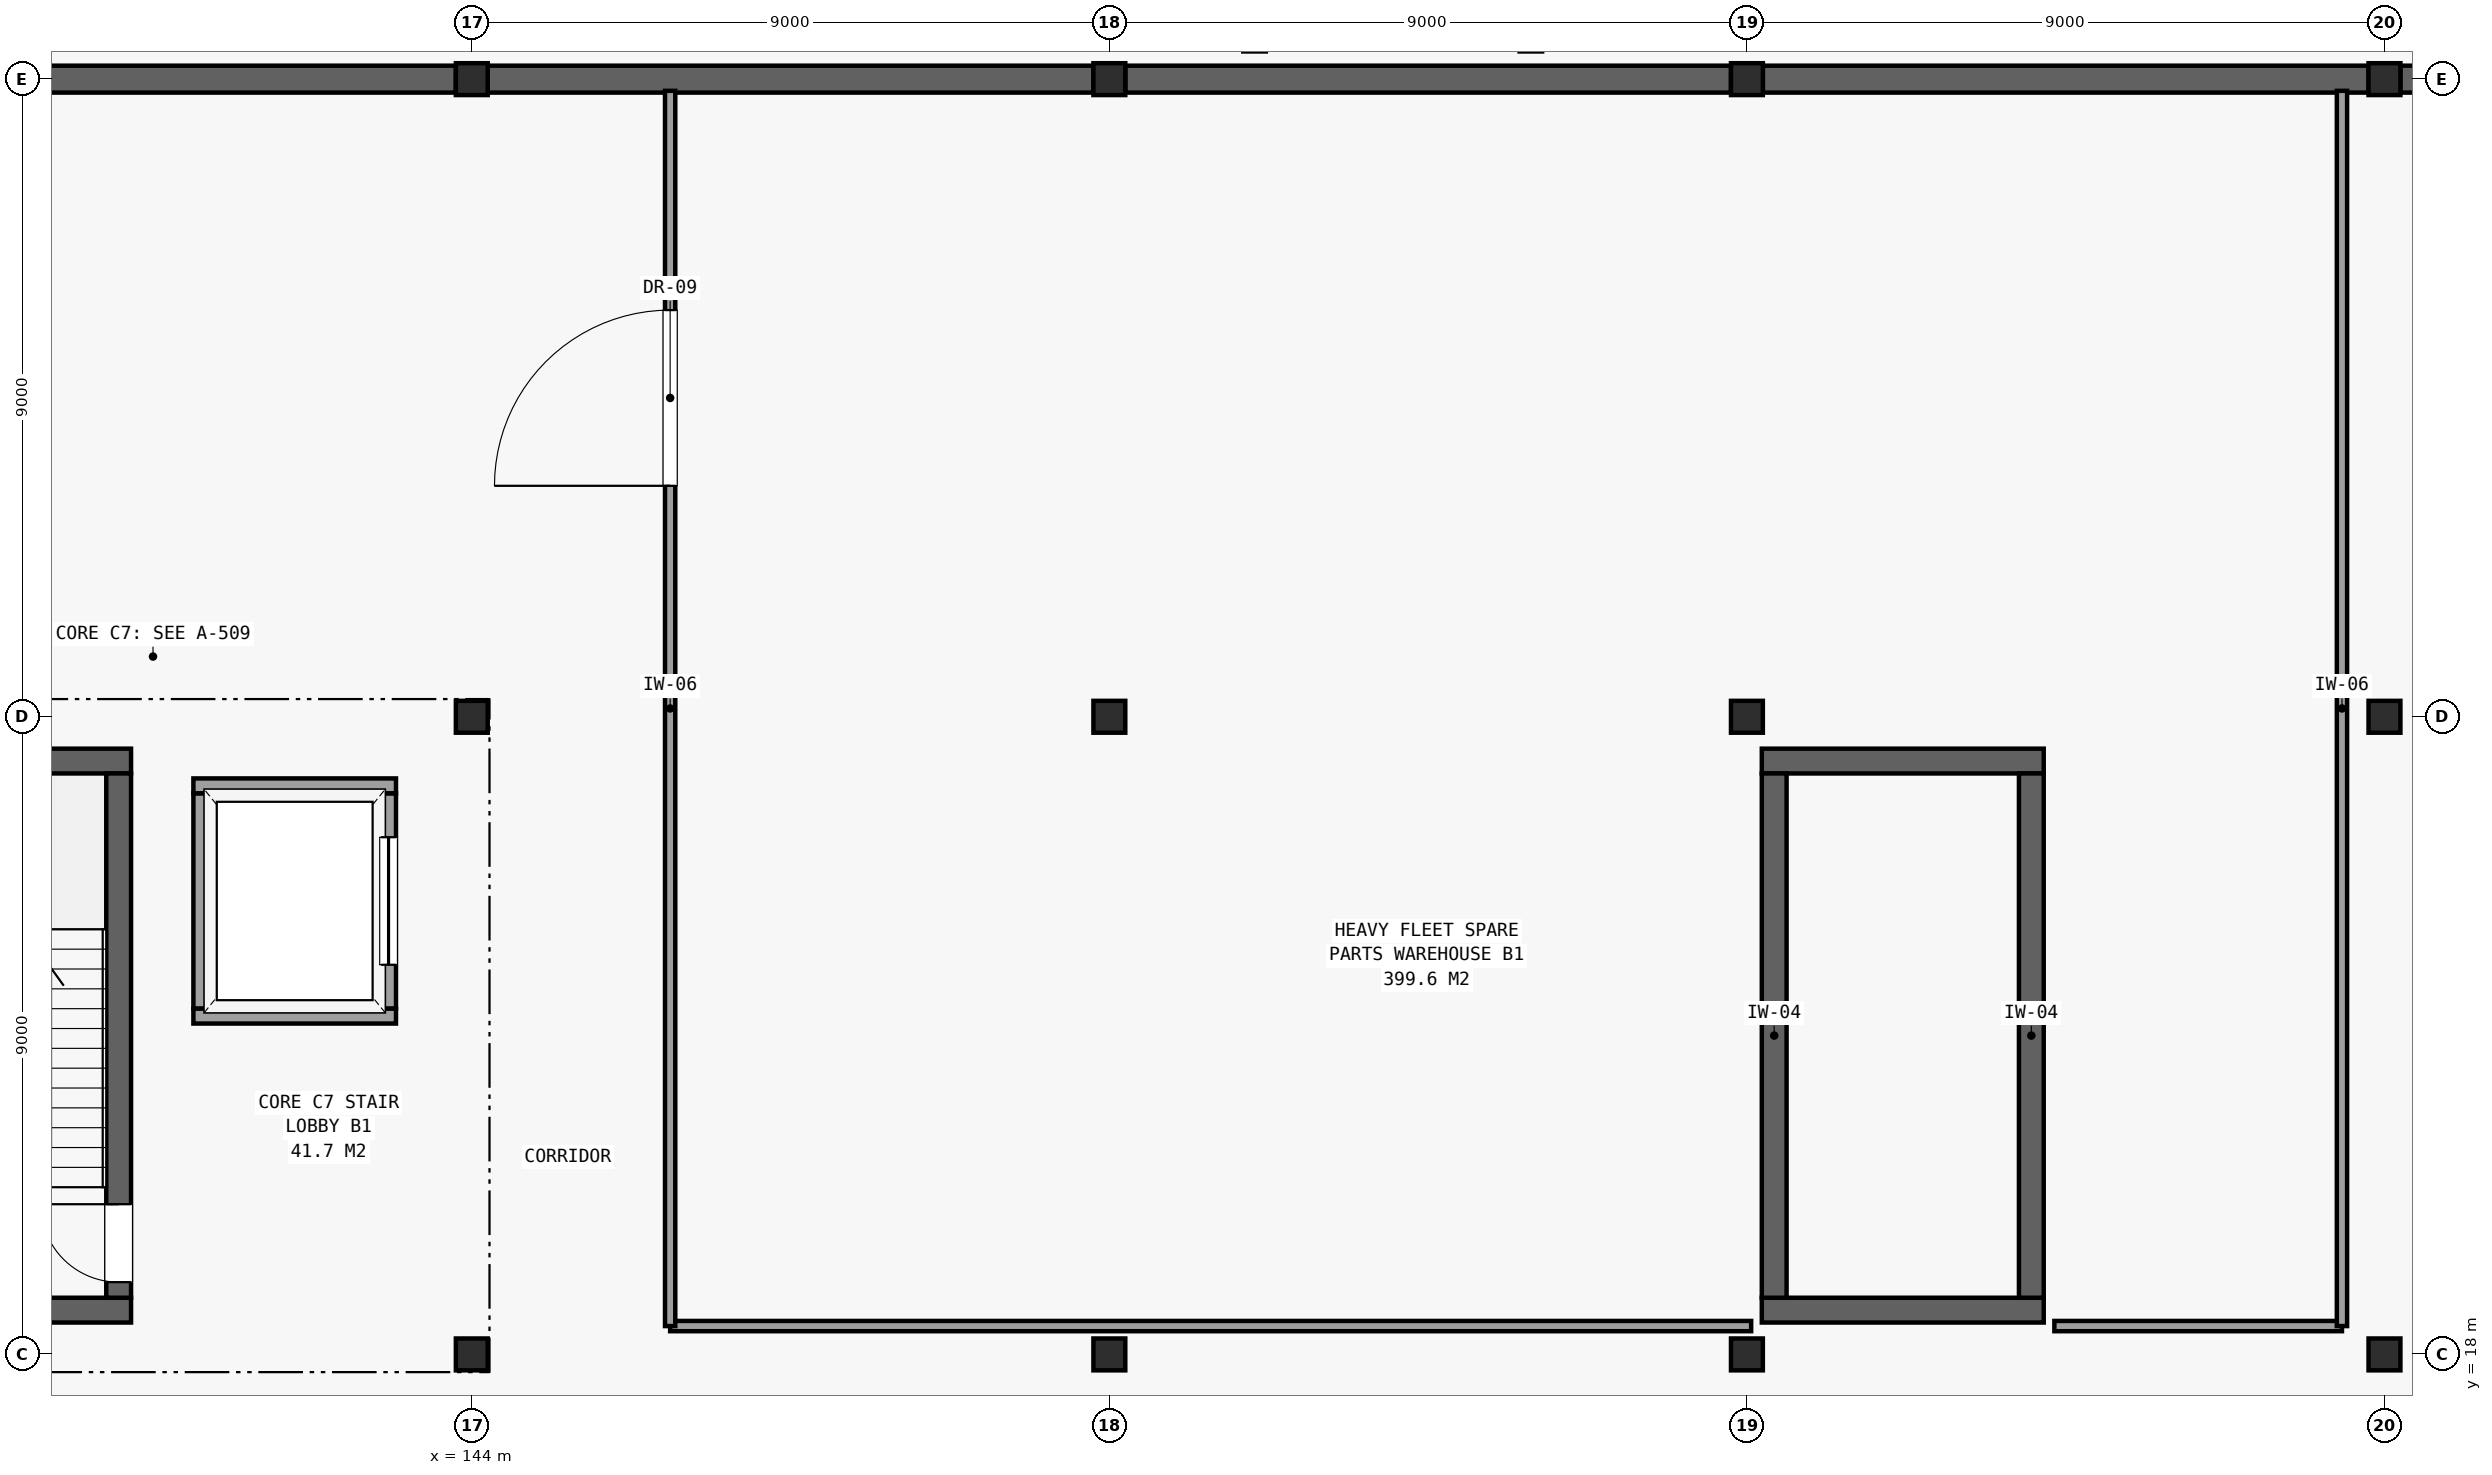
"""IFC4 building model, lengths in metres.
Left out: names, types, materials, properties, quantities, classifications, styles, units other than length and angle.
Written with IfcOpenShell. Run it as: python <this file> out.ifc"""

import sys

from ifc_helpers import new_model, si_unit, direction, frame, frame_2d, origin, origin_2d, place, context, subcontext, project, spatial, rectangle, hollow_rectangle, extrude, element, fill, save


model = new_model("IFC4")
c1 = context("Model", 3, precision=1e-05, world=origin(), true_north=direction((0.0, 1.0)))
c2 = subcontext(c1, "Body", "Model", "MODEL_VIEW")
j1 = project(units=[si_unit("LENGTHUNIT", "METRE"), si_unit("PLANEANGLEUNIT", "RADIAN")], contexts=[c1])
p1 = place(None, origin())
s1 = spatial("IfcSite", under=j1, at=p1, CompositionType="ELEMENT")
p2 = place(p1, origin())
s2 = spatial("IfcBuilding", under=s1, at=p2, CompositionType="ELEMENT")
p3 = place(p2, frame((0.0, 0.0, -4.8)))
s3 = spatial("IfcBuildingStorey", under=s2, at=p3, CompositionType="ELEMENT", Elevation=-4.8)
for number, where, z_axis, x_axis in (
    (1, (144.0, 18.0, 0.0), (0.0, 0.0, 1.0), (1.0, 0.0, 0.0)),
    (2, (144.0, 27.0, 0.0), (0.0, 0.0, 1.0), (1.0, 0.0, 0.0)),
    (3, (144.0, 36.0, 0.0), (0.0, 0.0, 1.0), (1.0, 0.0, 0.0)),
    (4, (153.0, 18.0, 0.0), (0.0, 0.0, 1.0), (1.0, 0.0, 0.0)),
    (5, (153.0, 27.0, 0.0), (0.0, 0.0, 1.0), (1.0, 0.0, 0.0)),
    (6, (153.0, 36.0, 0.0), (0.0, 0.0, 1.0), (1.0, 0.0, 0.0)),
    (7, (162.0, 18.0, 0.0), (0.0, 0.0, 1.0), (1.0, 0.0, 0.0)),
    (8, (162.0, 27.0, 0.0), (0.0, 0.0, 1.0), (1.0, 0.0, 0.0)),
    (9, (162.0, 36.0, 0.0), (0.0, 0.0, 1.0), (1.0, 0.0, 0.0)),
    (10, (171.0, 18.0, 0.0), (0.0, 0.0, 1.0), (1.0, 0.0, 0.0)),
    (11, (171.0, 27.0, 0.0), (0.0, 0.0, 1.0), (1.0, 0.0, 0.0)),
    (12, (171.0, 36.0, 0.0), (0.0, 0.0, 1.0), (1.0, 0.0, 0.0)),
):
    element("IfcColumn", number, at=place(p3, frame(where, z_axis=z_axis, x_axis=x_axis)), inside=s3, PredefinedType="COLUMN", context=c2, shape_type="SweptSolid", body=[
        extrude(hollow_rectangle(XDim=0.45, YDim=0.45, WallThickness=0.022, at=origin_2d()), origin(), (0.0, 0.0, 1.0), 4.8),
    ])
for number, where, z_axis, x_axis in (
    (13, (179.775, 36.0, 0.0), (0.0, 0.0, 1.0), (-1.0, 0.0, 0.0)),
    (14, (170.775, 36.0, 0.0), (0.0, 0.0, 1.0), (-1.0, 0.0, 0.0)),
    (15, (161.775, 36.0, 0.0), (0.0, 0.0, 1.0), (-1.0, 0.0, 0.0)),
    (16, (152.775, 36.0, 0.0), (0.0, 0.0, 1.0), (-1.0, 0.0, 0.0)),
    (17, (143.775, 36.0, 0.0), (0.0, 0.0, 1.0), (-1.0, 0.0, 0.0)),
):
    element("IfcWall", number, at=place(p3, frame(where, z_axis=z_axis, x_axis=x_axis)), inside=s3, PredefinedType="USERDEFINED", context=c2, shape_type="SweptSolid", body=[
        extrude(rectangle(XDim=8.55, YDim=0.38, at=frame_2d((4.275, 0.0))), origin(), (0.0, 0.0, 1.0), 4.13),
    ])
for number, where, z_axis, x_axis in (
    (18, (135.21, 18.625, 0.0), (0.0, 0.0, 1.0), (1.0, 0.0, 0.0)),
    (19, (135.21, 26.375, 0.0), (0.0, 0.0, 1.0), (1.0, 0.0, 0.0)),
):
    element("IfcWall", number, at=place(p3, frame(where, z_axis=z_axis, x_axis=x_axis)), inside=s3, PredefinedType="SHEAR", context=c2, shape_type="SweptSolid", body=[
        extrude(rectangle(XDim=3.98, YDim=0.35, at=frame_2d((1.99, 0.0))), origin(), (0.0, 0.0, 1.0), 4.52),
    ])
p4 = place(p3, frame((139.015, 18.8, 0.0), z_axis=(0.0, 0.0, 1.0), x_axis=(0.0, 1.0, 0.0)))
e20 = element("IfcWall", 20, at=p4, inside=s3, PredefinedType="SHEAR", context=c2, shape_type="SweptSolid", body=[
    extrude(rectangle(XDim=7.4, YDim=0.35, at=frame_2d((3.7, 0.0))), origin(), (0.0, 0.0, 1.0), 4.52),
])
p5 = place(p4, frame((0.22, 0.0, 0.0)))
e21 = element("IfcOpeningElement", 21, at=p5, cuts=e20, PredefinedType="OPENING", context=c2, shape_type="SweptSolid", body=[
    extrude(rectangle(XDim=1.1, YDim=2.15, at=frame_2d((0.55, 1.075))), frame((0.0, 0.186, 0.0), z_axis=(0.0, -1.0, 0.0), x_axis=(1.0, 0.0, 0.0)), (0.0, 0.0, 1.0), 0.372),
])
p6 = place(p3, frame((142.825, 22.88, 0.0), z_axis=(0.0, 0.0, 1.0), x_axis=(0.0, 1.0, 0.0)))
e22 = element("IfcWall", 22, at=p6, inside=s3, PredefinedType="PARTITIONING", context=c2, shape_type="SweptSolid", body=[
    extrude(rectangle(XDim=3.04, YDim=0.21, at=frame_2d((1.52, 0.0))), origin(), (0.0, 0.0, 1.0), 4.52),
])
p7 = place(p6, frame((0.62, 0.0, 0.0)))
e23 = element("IfcOpeningElement", 23, at=p7, cuts=e22, PredefinedType="OPENING", context=c2, shape_type="SweptSolid", body=[
    extrude(rectangle(XDim=1.8, YDim=2.4, at=frame_2d((0.9, 1.2))), frame((0.0, 0.116, 0.0), z_axis=(0.0, -1.0, 0.0), x_axis=(1.0, 0.0, 0.0)), (0.0, 0.0, 1.0), 0.232),
])
p8 = place(p3, frame((140.175, 22.88, 0.0), z_axis=(0.0, 0.0, 1.0), x_axis=(0.0, 1.0, 0.0)))
e24 = element("IfcWall", 24, at=p8, inside=s3, PredefinedType="PARTITIONING", context=c2, shape_type="SweptSolid", body=[
    extrude(rectangle(XDim=3.04, YDim=0.21, at=frame_2d((1.52, 0.0))), origin(), (0.0, 0.0, 1.0), 4.52),
])
for number, where, z_axis, x_axis in (
    (25, (140.07, 22.775, 0.0), (0.0, 0.0, 1.0), (1.0, 0.0, 0.0)),
    (26, (140.07, 26.025, 0.0), (0.0, 0.0, 1.0), (1.0, 0.0, 0.0)),
):
    element("IfcWall", number, at=place(p3, frame(where, z_axis=z_axis, x_axis=x_axis)), inside=s3, PredefinedType="PARTITIONING", context=c2, shape_type="SweptSolid", body=[
        extrude(rectangle(XDim=2.86, YDim=0.21, at=frame_2d((1.43, 0.0))), origin(), (0.0, 0.0, 1.0), 4.52),
    ])
for number, where, z_axis, x_axis in (
    (27, (162.21, 18.625, 0.0), (0.0, 0.0, 1.0), (1.0, 0.0, 0.0)),
    (28, (162.21, 26.375, 0.0), (0.0, 0.0, 1.0), (1.0, 0.0, 0.0)),
):
    element("IfcWall", number, at=place(p3, frame(where, z_axis=z_axis, x_axis=x_axis)), inside=s3, PredefinedType="SHEAR", context=c2, shape_type="SweptSolid", body=[
        extrude(rectangle(XDim=3.98, YDim=0.35, at=frame_2d((1.99, 0.0))), origin(), (0.0, 0.0, 1.0), 4.52),
    ])
for number, where, z_axis, x_axis in (
    (29, (162.385, 18.8, 0.0), (0.0, 0.0, 1.0), (0.0, 1.0, 0.0)),
    (30, (166.015, 18.8, 0.0), (0.0, 0.0, 1.0), (0.0, 1.0, 0.0)),
):
    element("IfcWall", number, at=place(p3, frame(where, z_axis=z_axis, x_axis=x_axis)), inside=s3, PredefinedType="SHEAR", context=c2, shape_type="SweptSolid", body=[
        extrude(rectangle(XDim=7.4, YDim=0.35, at=frame_2d((3.7, 0.0))), origin(), (0.0, 0.0, 1.0), 4.52),
    ])
p9 = place(p3, frame((146.8, 18.4, 0.0), z_axis=(0.0, 0.0, 1.0), x_axis=(1.0, 0.0, 0.0)))
e31 = element("IfcWall", 31, at=p9, inside=s3, PredefinedType="PARTITIONING", context=c2, shape_type="SweptSolid", body=[
    extrude(rectangle(XDim=15.26, YDim=0.145, at=frame_2d((7.63, 0.0))), origin(), (0.0, 0.0, 1.0), 3.87),
])
p10 = place(p3, frame((166.34, 18.4, 0.0), z_axis=(0.0, 0.0, 1.0), x_axis=(1.0, 0.0, 0.0)))
e32 = element("IfcWall", 32, at=p10, inside=s3, PredefinedType="PARTITIONING", context=c2, shape_type="SweptSolid", body=[
    extrude(rectangle(XDim=4.06, YDim=0.145, at=frame_2d((2.03, 0.0))), origin(), (0.0, 0.0, 1.0), 4.52),
])
p11 = place(p3, frame((146.8, 18.4, 0.0), z_axis=(0.0, 0.0, 1.0), x_axis=(0.0, 1.0, 0.0)))
e33 = element("IfcWall", 33, at=p11, inside=s3, PredefinedType="PARTITIONING", context=c2, shape_type="SweptSolid", body=[
    extrude(rectangle(XDim=17.435, YDim=0.145, at=frame_2d((8.718, 0.0))), origin(), (0.0, 0.0, 1.0), 3.92),
])
p12 = place(p11, frame((11.86, 0.0, 0.0)))
e34 = element("IfcOpeningElement", 34, at=p12, cuts=e33, PredefinedType="OPENING", context=c2, shape_type="SweptSolid", body=[
    extrude(rectangle(XDim=2.48, YDim=3.026, at=frame_2d((1.24, 1.513))), frame((0.0, 0.083, 0.0), z_axis=(0.0, -1.0, 0.0), x_axis=(1.0, 0.0, 0.0)), (0.0, 0.0, 1.0), 0.167),
])
p13 = place(p3, frame((170.4, 18.4, 0.0), z_axis=(0.0, 0.0, 1.0), x_axis=(0.0, 1.0, 0.0)))
e35 = element("IfcWall", 35, at=p13, inside=s3, PredefinedType="PARTITIONING", context=c2, shape_type="SweptSolid", body=[
    extrude(rectangle(XDim=17.435, YDim=0.145, at=frame_2d((8.718, 0.0))), origin(), (0.0, 0.0, 1.0), 3.92),
])
p14 = place(p5, origin())
e36 = element("IfcDoor", 36, at=p14, inside=s3, OperationType="SINGLE_SWING_RIGHT", PredefinedType="DOOR", context=c2, shape_type="SweptSolid", body=[
    extrude(rectangle(XDim=1.1, YDim=2.15, at=frame_2d((0.55, 1.075))), frame((0.0, 0.025, 0.0), z_axis=(0.0, -1.0, 0.0), x_axis=(1.0, 0.0, 0.0)), (0.0, 0.0, 1.0), 0.05),
])
fill(e21, e36)
p15 = place(p7, origin())
e37 = element("IfcDoor", 37, at=p15, inside=s3, OperationType="SLIDING_TO_LEFT", PredefinedType="DOOR", context=c2, shape_type="SweptSolid", body=[
    extrude(rectangle(XDim=1.8, YDim=2.4, at=frame_2d((0.9, 1.2))), frame((0.0, 0.025, 0.0), z_axis=(0.0, -1.0, 0.0), x_axis=(1.0, 0.0, 0.0)), (0.0, 0.0, 1.0), 0.05),
])
fill(e23, e37)
p16 = place(p12, origin())
e38 = element("IfcDoor", 38, at=p16, inside=s3, OperationType="SINGLE_SWING_LEFT", PredefinedType="DOOR", context=c2, shape_type="SweptSolid", body=[
    extrude(rectangle(XDim=2.48, YDim=3.026, at=frame_2d((1.24, 1.513))), frame((0.0, 0.025, 0.0), z_axis=(0.0, -1.0, 0.0), x_axis=(1.0, 0.0, 0.0)), (0.0, 0.0, 1.0), 0.05),
])
fill(e34, e38)
save(model, sys.argv[1])
